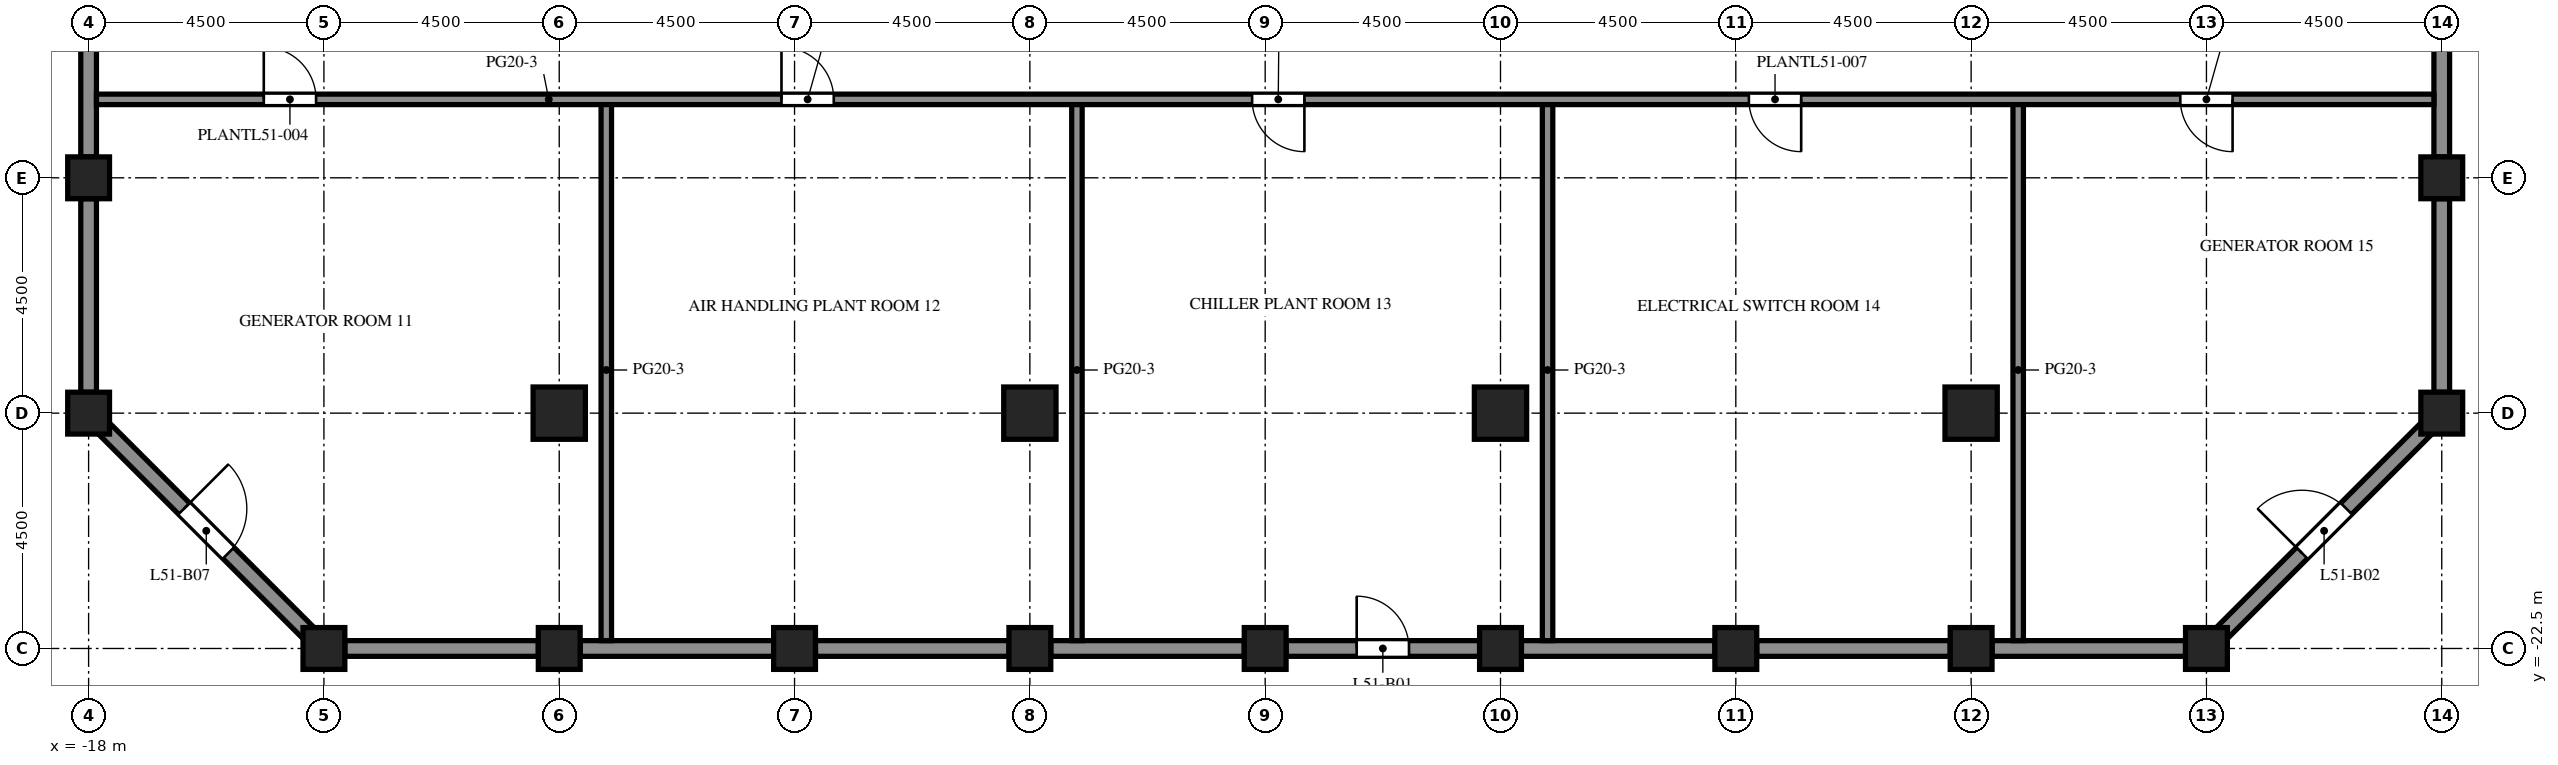
"""IFC4 building model, lengths in metres.
Left out: names, types, materials, properties, quantities, classifications, styles, units other than length and angle.
Written with IfcOpenShell. Run it as: python <this file> out.ifc"""

import sys

from ifc_helpers import new_model, si_unit, direction, frame, frame_2d, origin, origin_2d, place, context, subcontext, project, spatial, rectangle, extrude, element, fill, save


model = new_model("IFC4")
c1 = context("Model", 3, precision=1e-05, world=origin(), true_north=direction((0.0, 1.0)))
c2 = subcontext(c1, "Body", "Model", "MODEL_VIEW")
j1 = project(units=[si_unit("LENGTHUNIT", "METRE"), si_unit("PLANEANGLEUNIT", "RADIAN")], contexts=[c1])
p1 = place(None, origin())
s1 = spatial("IfcSite", under=j1, at=p1, CompositionType="ELEMENT")
p2 = place(p1, origin())
s2 = spatial("IfcBuilding", under=s1, at=p2, CompositionType="ELEMENT")
p3 = place(p2, frame((0.0, 0.0, 226.2)))
s3 = spatial("IfcBuildingStorey", under=s2, at=p3, CompositionType="ELEMENT", Elevation=226.2)
for number, where, z_axis, x_axis in (
    (1, (-18.0, -18.0, -0.6), (0.0, 0.0, 1.0), (1.0, 0.0, 0.0)),
    (2, (-18.0, -13.5, -0.6), (0.0, 0.0, 1.0), (1.0, 0.0, 0.0)),
    (3, (-13.5, -22.5, -0.6), (0.0, 0.0, 1.0), (1.0, 0.0, 0.0)),
    (4, (-9.0, -22.5, -0.6), (0.0, 0.0, 1.0), (1.0, 0.0, 0.0)),
    (5, (-4.5, -22.5, -0.6), (0.0, 0.0, 1.0), (1.0, 0.0, 0.0)),
    (6, (0.0, -22.5, -0.6), (0.0, 0.0, 1.0), (1.0, 0.0, 0.0)),
    (7, (4.5, -22.5, -0.6), (0.0, 0.0, 1.0), (1.0, 0.0, 0.0)),
    (8, (9.0, -22.5, -0.6), (0.0, 0.0, 1.0), (1.0, 0.0, 0.0)),
    (9, (13.5, -22.5, -0.6), (0.0, 0.0, 1.0), (1.0, 0.0, 0.0)),
    (10, (18.0, -22.5, -0.6), (0.0, 0.0, 1.0), (1.0, 0.0, 0.0)),
    (11, (22.5, -22.5, -0.6), (0.0, 0.0, 1.0), (1.0, 0.0, 0.0)),
    (12, (27.0, -18.0, -0.6), (0.0, 0.0, 1.0), (1.0, 0.0, 0.0)),
    (13, (27.0, -13.5, -0.6), (0.0, 0.0, 1.0), (1.0, 0.0, 0.0)),
):
    element("IfcColumn", number, at=place(p3, frame(where, z_axis=z_axis, x_axis=x_axis)), inside=s3, PredefinedType="COLUMN", context=c2, shape_type="SweptSolid", body=[
        extrude(rectangle(XDim=0.8, YDim=0.8, at=origin_2d()), origin(), (0.0, 0.0, 1.0), 6.0),
    ])
for number, where, z_axis, x_axis in (
    (14, (-9.0, -18.0, -0.6), (0.0, 0.0, 1.0), (1.0, 0.0, 0.0)),
    (15, (0.0, -18.0, -0.6), (0.0, 0.0, 1.0), (1.0, 0.0, 0.0)),
    (16, (9.0, -18.0, -0.6), (0.0, 0.0, 1.0), (1.0, 0.0, 0.0)),
    (17, (18.0, -18.0, -0.6), (0.0, 0.0, 1.0), (1.0, 0.0, 0.0)),
):
    element("IfcColumn", number, at=place(p3, frame(where, z_axis=z_axis, x_axis=x_axis)), inside=s3, PredefinedType="COLUMN", context=c2, shape_type="SweptSolid", body=[
        extrude(rectangle(XDim=1.0, YDim=1.0, at=origin_2d()), origin(), (0.0, 0.0, 1.0), 6.0),
    ])
for number, where, z_axis, x_axis in (
    (18, (-9.4, -22.5, 0.0), (0.0, 0.0, 1.0), (-1.0, 0.0, 0.0)),
    (19, (-4.9, -22.5, 0.0), (0.0, 0.0, 1.0), (-1.0, 0.0, 0.0)),
    (20, (-0.4, -22.5, 0.0), (0.0, 0.0, 1.0), (-1.0, 0.0, 0.0)),
    (21, (4.1, -22.5, 0.0), (0.0, 0.0, 1.0), (-1.0, 0.0, 0.0)),
):
    element("IfcWall", number, at=place(p3, frame(where, z_axis=z_axis, x_axis=x_axis)), inside=s3, PredefinedType="SOLIDWALL", context=c2, shape_type="SweptSolid", body=[
        extrude(rectangle(XDim=3.7, YDim=0.3, at=frame_2d((1.85, 0.0))), origin(), (0.0, 0.0, 1.0), 3.75),
    ])
p4 = place(p3, frame((8.6, -22.5, 0.0), z_axis=(0.0, 0.0, 1.0), x_axis=(-1.0, 0.0, 0.0)))
e22 = element("IfcWall", 22, at=p4, inside=s3, PredefinedType="SOLIDWALL", context=c2, shape_type="SweptSolid", body=[
    extrude(rectangle(XDim=3.7, YDim=0.3, at=frame_2d((1.85, 0.0))), origin(), (0.0, 0.0, 1.0), 3.75),
])
p5 = place(p4, frame((1.35, 0.0, 0.0)))
e23 = element("IfcOpeningElement", 23, at=p5, cuts=e22, PredefinedType="OPENING", context=c2, shape_type="SweptSolid", body=[
    extrude(rectangle(XDim=1.0, YDim=2.2, at=frame_2d((0.5, 1.1))), frame((0.0, 0.16, 0.0), z_axis=(0.0, -1.0, 0.0), x_axis=(1.0, 0.0, 0.0)), (0.0, 0.0, 1.0), 0.32),
])
for number, where, z_axis, x_axis in (
    (24, (13.1, -22.5, 0.0), (0.0, 0.0, 1.0), (-1.0, 0.0, 0.0)),
    (25, (17.6, -22.5, 0.0), (0.0, 0.0, 1.0), (-1.0, 0.0, 0.0)),
    (26, (22.1, -22.5, 0.0), (0.0, 0.0, 1.0), (-1.0, 0.0, 0.0)),
):
    element("IfcWall", number, at=place(p3, frame(where, z_axis=z_axis, x_axis=x_axis)), inside=s3, PredefinedType="SOLIDWALL", context=c2, shape_type="SweptSolid", body=[
        extrude(rectangle(XDim=3.7, YDim=0.3, at=frame_2d((1.85, 0.0))), origin(), (0.0, 0.0, 1.0), 3.75),
    ])
p6 = place(p3, frame((26.706, -18.294, 0.0), z_axis=(0.0, 0.0, 1.0), x_axis=(-0.707106781187, -0.707106781187, 0.0)))
e27 = element("IfcWall", 27, at=p6, inside=s3, PredefinedType="SOLIDWALL", context=c2, shape_type="SweptSolid", body=[
    extrude(rectangle(XDim=5.532, YDim=0.3, at=frame_2d((2.766, 0.0))), origin(), (0.0, 0.0, 1.0), 3.75),
])
p7 = place(p6, frame((2.166, 0.0, 0.0)))
e28 = element("IfcOpeningElement", 28, at=p7, cuts=e27, PredefinedType="OPENING", context=c2, shape_type="SweptSolid", body=[
    extrude(rectangle(XDim=1.2, YDim=2.2, at=frame_2d((0.6, 1.1))), frame((0.0, 0.16, 0.0), z_axis=(0.0, -1.0, 0.0), x_axis=(1.0, 0.0, 0.0)), (0.0, 0.0, 1.0), 0.32),
])
for number, where, z_axis, x_axis in (
    (29, (27.0, -13.9, 0.0), (0.0, 0.0, 1.0), (0.0, -1.0, 0.0)),
    (30, (27.0, -9.4, 0.0), (0.0, 0.0, 1.0), (0.0, -1.0, 0.0)),
    (31, (-18.0, -13.1, 0.0), (0.0, 0.0, 1.0), (0.0, 1.0, 0.0)),
    (32, (-18.0, -17.6, 0.0), (0.0, 0.0, 1.0), (0.0, 1.0, 0.0)),
):
    element("IfcWall", number, at=place(p3, frame(where, z_axis=z_axis, x_axis=x_axis)), inside=s3, PredefinedType="SOLIDWALL", context=c2, shape_type="SweptSolid", body=[
        extrude(rectangle(XDim=3.7, YDim=0.3, at=frame_2d((1.85, 0.0))), origin(), (0.0, 0.0, 1.0), 3.75),
    ])
p8 = place(p3, frame((-13.794, -22.206, 0.0), z_axis=(0.0, 0.0, 1.0), x_axis=(-0.707106781187, 0.707106781187, 0.0)))
e33 = element("IfcWall", 33, at=p8, inside=s3, PredefinedType="SOLIDWALL", context=c2, shape_type="SweptSolid", body=[
    extrude(rectangle(XDim=5.532, YDim=0.3, at=frame_2d((2.766, 0.0))), origin(), (0.0, 0.0, 1.0), 3.75),
])
p9 = place(p8, frame((2.166, 0.0, 0.0)))
e34 = element("IfcOpeningElement", 34, at=p9, cuts=e33, PredefinedType="OPENING", context=c2, shape_type="SweptSolid", body=[
    extrude(rectangle(XDim=1.2, YDim=2.2, at=frame_2d((0.6, 1.1))), frame((0.0, 0.16, 0.0), z_axis=(0.0, -1.0, 0.0), x_axis=(1.0, 0.0, 0.0)), (0.0, 0.0, 1.0), 0.32),
])
for number, where, z_axis, x_axis in (
    (35, (-8.1, -22.35, 0.0), (0.0, 0.0, 1.0), (0.0, 1.0, 0.0)),
    (36, (0.9, -22.35, 0.0), (0.0, 0.0, 1.0), (0.0, 1.0, 0.0)),
    (37, (9.9, -22.35, 0.0), (0.0, 0.0, 1.0), (0.0, 1.0, 0.0)),
    (38, (18.9, -22.35, 0.0), (0.0, 0.0, 1.0), (0.0, 1.0, 0.0)),
):
    element("IfcWall", number, at=place(p3, frame(where, z_axis=z_axis, x_axis=x_axis)), inside=s3, PredefinedType="PARTITIONING", context=c2, shape_type="SweptSolid", body=[
        extrude(rectangle(XDim=10.35, YDim=0.2, at=frame_2d((5.175, 0.0))), origin(), (0.0, 0.0, 1.0), 4.95),
    ])
p10 = place(p3, frame((26.85, -12.0, 0.0), z_axis=(0.0, 0.0, 1.0), x_axis=(-1.0, 0.0, 0.0)))
e39 = element("IfcWall", 39, at=p10, inside=s3, PredefinedType="PARTITIONING", context=c2, shape_type="SweptSolid", body=[
    extrude(rectangle(XDim=44.7, YDim=0.2, at=frame_2d((22.35, 0.0))), origin(), (0.0, 0.0, 1.0), 4.95),
])
p11 = place(p10, frame((40.5, 0.0, 0.0)))
e40 = element("IfcOpeningElement", 40, at=p11, cuts=e39, PredefinedType="OPENING", context=c2, shape_type="SweptSolid", body=[
    extrude(rectangle(XDim=1.0, YDim=2.1, at=frame_2d((0.5, 1.05))), frame((0.0, 0.11, 0.0), z_axis=(0.0, -1.0, 0.0), x_axis=(1.0, 0.0, 0.0)), (0.0, 0.0, 1.0), 0.22),
])
p12 = place(p10, frame((30.6, 0.0, 0.0)))
e41 = element("IfcOpeningElement", 41, at=p12, cuts=e39, PredefinedType="OPENING", context=c2, shape_type="SweptSolid", body=[
    extrude(rectangle(XDim=1.0, YDim=2.1, at=frame_2d((0.5, 1.05))), frame((0.0, 0.11, 0.0), z_axis=(0.0, -1.0, 0.0), x_axis=(1.0, 0.0, 0.0)), (0.0, 0.0, 1.0), 0.22),
])
p13 = place(p10, frame((21.6, 0.0, 0.0)))
e42 = element("IfcOpeningElement", 42, at=p13, cuts=e39, PredefinedType="OPENING", context=c2, shape_type="SweptSolid", body=[
    extrude(rectangle(XDim=1.0, YDim=2.1, at=frame_2d((0.5, 1.05))), frame((0.0, 0.11, 0.0), z_axis=(0.0, -1.0, 0.0), x_axis=(1.0, 0.0, 0.0)), (0.0, 0.0, 1.0), 0.22),
])
p14 = place(p10, frame((12.1, 0.0, 0.0)))
e43 = element("IfcOpeningElement", 43, at=p14, cuts=e39, PredefinedType="OPENING", context=c2, shape_type="SweptSolid", body=[
    extrude(rectangle(XDim=1.0, YDim=2.1, at=frame_2d((0.5, 1.05))), frame((0.0, 0.11, 0.0), z_axis=(0.0, -1.0, 0.0), x_axis=(1.0, 0.0, 0.0)), (0.0, 0.0, 1.0), 0.22),
])
p15 = place(p10, frame((3.85, 0.0, 0.0)))
e44 = element("IfcOpeningElement", 44, at=p15, cuts=e39, PredefinedType="OPENING", context=c2, shape_type="SweptSolid", body=[
    extrude(rectangle(XDim=1.0, YDim=2.1, at=frame_2d((0.5, 1.05))), frame((0.0, 0.11, 0.0), z_axis=(0.0, -1.0, 0.0), x_axis=(1.0, 0.0, 0.0)), (0.0, 0.0, 1.0), 0.22),
])
p16 = place(p5, origin())
e45 = element("IfcDoor", 45, at=p16, inside=s3, OperationType="SINGLE_SWING_RIGHT", PredefinedType="DOOR", context=c2, shape_type="SweptSolid", body=[
    extrude(rectangle(XDim=1.0, YDim=2.2, at=frame_2d((0.5, 1.1))), frame((0.0, 0.025, 0.0), z_axis=(0.0, -1.0, 0.0), x_axis=(1.0, 0.0, 0.0)), (0.0, 0.0, 1.0), 0.05),
])
fill(e23, e45)
p17 = place(p7, origin())
e46 = element("IfcDoor", 46, at=p17, inside=s3, OperationType="SINGLE_SWING_RIGHT", PredefinedType="DOOR", context=c2, shape_type="SweptSolid", body=[
    extrude(rectangle(XDim=1.2, YDim=2.2, at=frame_2d((0.6, 1.1))), frame((0.0, 0.025, 0.0), z_axis=(0.0, -1.0, 0.0), x_axis=(1.0, 0.0, 0.0)), (0.0, 0.0, 1.0), 0.05),
])
fill(e28, e46)
p18 = place(p9, origin())
e47 = element("IfcDoor", 47, at=p18, inside=s3, OperationType="SINGLE_SWING_RIGHT", PredefinedType="DOOR", context=c2, shape_type="SweptSolid", body=[
    extrude(rectangle(XDim=1.2, YDim=2.2, at=frame_2d((0.6, 1.1))), frame((0.0, 0.025, 0.0), z_axis=(0.0, -1.0, 0.0), x_axis=(1.0, 0.0, 0.0)), (0.0, 0.0, 1.0), 0.05),
])
fill(e34, e47)
p19 = place(p11, origin())
e48 = element("IfcDoor", 48, at=p19, inside=s3, OperationType="SINGLE_SWING_RIGHT", PredefinedType="DOOR", context=c2, shape_type="SweptSolid", body=[
    extrude(rectangle(XDim=1.0, YDim=2.1, at=frame_2d((0.5, 1.05))), frame((0.0, 0.025, 0.0), z_axis=(0.0, -1.0, 0.0), x_axis=(1.0, 0.0, 0.0)), (0.0, 0.0, 1.0), 0.05),
])
fill(e40, e48)
p20 = place(p12, origin())
e49 = element("IfcDoor", 49, at=p20, inside=s3, OperationType="SINGLE_SWING_RIGHT", PredefinedType="DOOR", context=c2, shape_type="SweptSolid", body=[
    extrude(rectangle(XDim=1.0, YDim=2.1, at=frame_2d((0.5, 1.05))), frame((0.0, 0.025, 0.0), z_axis=(0.0, -1.0, 0.0), x_axis=(1.0, 0.0, 0.0)), (0.0, 0.0, 1.0), 0.05),
])
fill(e41, e49)
p21 = place(p13, origin())
e50 = element("IfcDoor", 50, at=p21, inside=s3, OperationType="SINGLE_SWING_LEFT", PredefinedType="DOOR", context=c2, shape_type="SweptSolid", body=[
    extrude(rectangle(XDim=1.0, YDim=2.1, at=frame_2d((0.5, 1.05))), frame((0.0, 0.025, 0.0), z_axis=(0.0, -1.0, 0.0), x_axis=(1.0, 0.0, 0.0)), (0.0, 0.0, 1.0), 0.05),
])
fill(e42, e50)
p22 = place(p14, origin())
e51 = element("IfcDoor", 51, at=p22, inside=s3, OperationType="SINGLE_SWING_LEFT", PredefinedType="DOOR", context=c2, shape_type="SweptSolid", body=[
    extrude(rectangle(XDim=1.0, YDim=2.1, at=frame_2d((0.5, 1.05))), frame((0.0, 0.025, 0.0), z_axis=(0.0, -1.0, 0.0), x_axis=(1.0, 0.0, 0.0)), (0.0, 0.0, 1.0), 0.05),
])
fill(e43, e51)
p23 = place(p15, origin())
e52 = element("IfcDoor", 52, at=p23, inside=s3, OperationType="SINGLE_SWING_LEFT", PredefinedType="DOOR", context=c2, shape_type="SweptSolid", body=[
    extrude(rectangle(XDim=1.0, YDim=2.1, at=frame_2d((0.5, 1.05))), frame((0.0, 0.025, 0.0), z_axis=(0.0, -1.0, 0.0), x_axis=(1.0, 0.0, 0.0)), (0.0, 0.0, 1.0), 0.05),
])
fill(e44, e52)
save(model, sys.argv[1])
